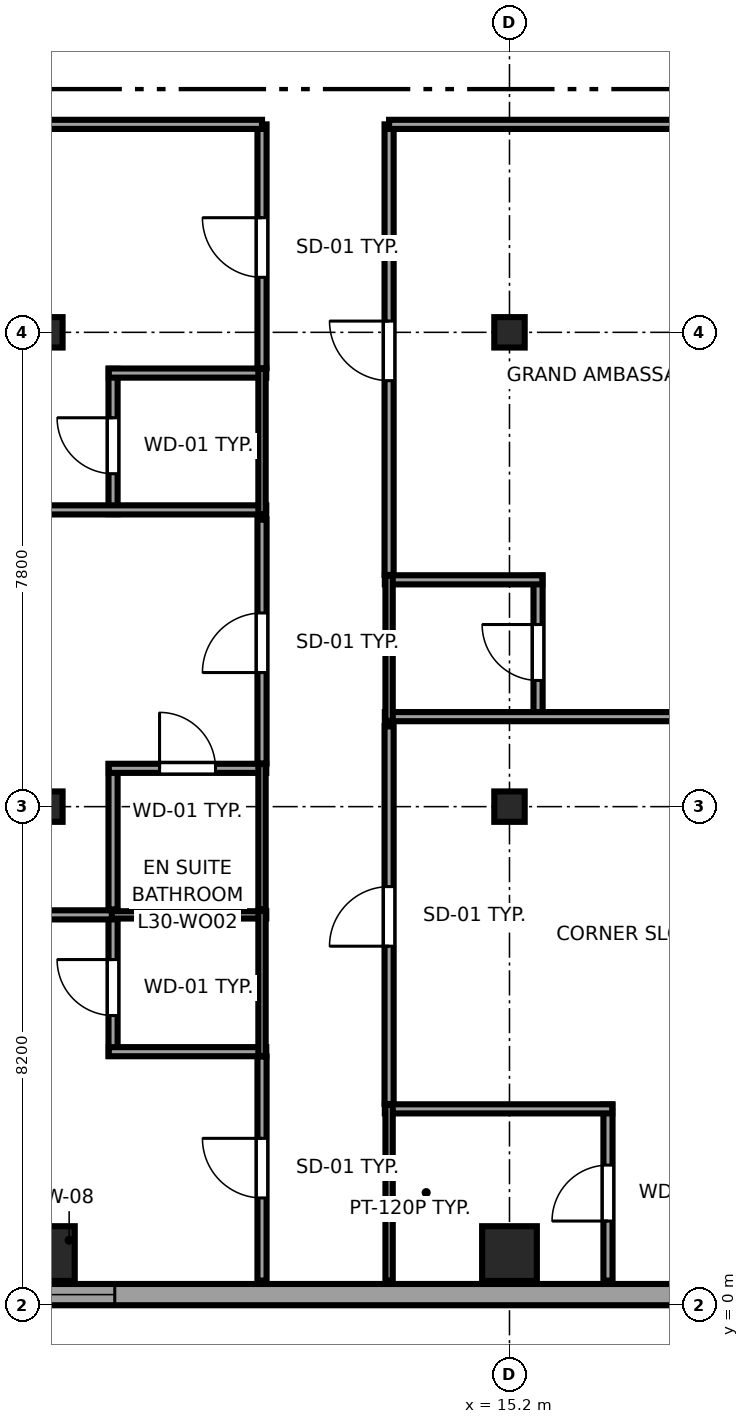
"""IFC4 building model, lengths in metres.
Left out: names, types, materials, properties, quantities, classifications, styles, units other than length and angle.
Written with IfcOpenShell. Run it as: python <this file> out.ifc"""

import sys

from ifc_helpers import new_model, si_unit, direction, frame, frame_2d, origin, origin_2d, place, context, subcontext, project, spatial, rectangle, i_section, extrude, source, transform, mapped, element, fill, save


model = new_model("IFC4")
c1 = context("Model", 3, precision=1e-05, world=origin(), true_north=direction((0.0, 1.0)))
c2 = subcontext(c1, "Body", "Model", "MODEL_VIEW")
j1 = project(units=[si_unit("LENGTHUNIT", "METRE"), si_unit("PLANEANGLEUNIT", "RADIAN")], contexts=[c1])
p1 = place(None, origin())
s1 = spatial("IfcSite", under=j1, at=p1, CompositionType="ELEMENT")
p2 = place(p1, origin())
s2 = spatial("IfcBuilding", under=s1, at=p2, CompositionType="ELEMENT")
p3 = place(p2, frame((0.0, 0.0, 118.65)))
s3 = spatial("IfcBuildingStorey", under=s2, at=p3, CompositionType="ELEMENT", Elevation=118.65)
m1 = source(origin(), c2, "Body", "SweptSolid", [
    extrude(rectangle(XDim=0.9, YDim=0.9, at=origin_2d()), origin(), (0.0, 0.0, 1.0), 3.55),
])
p4 = place(p3, frame((7.6, 0.85, 0.0), z_axis=(0.0, 0.0, 1.0), x_axis=(1.0, 0.0, 0.0)))
e1 = element("IfcColumn", 1, at=p4, inside=s3, PredefinedType="COLUMN", context=c2, shape_type="MappedRepresentation", body=[
    mapped(m1, transform((0.0, 0.0, 0.0), x_axis=(1.0, 0.0, 0.0), y_axis=(0.0, 1.0, 0.0), z_axis=(0.0, 0.0, 1.0), scale=1.0)),
])
m2 = source(origin(), c2, "Body", "SweptSolid", [
    extrude(i_section(OverallWidth=0.5, OverallDepth=0.5, WebThickness=0.022, FlangeThickness=0.034, at=origin_2d()), origin(), (0.0, 0.0, 1.0), 3.55),
])
for number, where, z_axis, x_axis in (
    (2, (7.6, 8.2, 0.0), (0.0, 0.0, 1.0), (1.0, 0.0, 0.0)),
    (3, (7.6, 16.0, 0.0), (0.0, 0.0, 1.0), (1.0, 0.0, 0.0)),
):
    element("IfcColumn", number, at=place(p3, frame(where, z_axis=z_axis, x_axis=x_axis)), inside=s3, PredefinedType="COLUMN", context=c2, shape_type="MappedRepresentation", body=[
        mapped(m2, transform((0.0, 0.0, 0.0), x_axis=(1.0, 0.0, 0.0), y_axis=(0.0, 1.0, 0.0), z_axis=(0.0, 0.0, 1.0), scale=1.0)),
    ])
p5 = place(p3, frame((15.2, 0.85, 0.0), z_axis=(0.0, 0.0, 1.0), x_axis=(1.0, 0.0, 0.0)))
e4 = element("IfcColumn", 4, at=p5, inside=s3, PredefinedType="COLUMN", context=c2, shape_type="MappedRepresentation", body=[
    mapped(m1, transform((0.0, 0.0, 0.0), x_axis=(1.0, 0.0, 0.0), y_axis=(0.0, 1.0, 0.0), z_axis=(0.0, 0.0, 1.0), scale=1.0)),
])
for number, where, z_axis, x_axis in (
    (5, (15.2, 8.2, 0.0), (0.0, 0.0, 1.0), (1.0, 0.0, 0.0)),
    (6, (15.2, 16.0, 0.0), (0.0, 0.0, 1.0), (1.0, 0.0, 0.0)),
):
    element("IfcColumn", number, at=place(p3, frame(where, z_axis=z_axis, x_axis=x_axis)), inside=s3, PredefinedType="COLUMN", context=c2, shape_type="MappedRepresentation", body=[
        mapped(m2, transform((0.0, 0.0, 0.0), x_axis=(1.0, 0.0, 0.0), y_axis=(0.0, 1.0, 0.0), z_axis=(0.0, 0.0, 1.0), scale=1.0)),
    ])
p6 = place(p3, frame((4.617, 0.175, 0.0), z_axis=(0.0, 0.0, 1.0), x_axis=(1.0, 0.0, 0.0)))
e7 = element("IfcWall", 7, at=p6, inside=s3, PredefinedType="SOLIDWALL", context=c2, shape_type="SweptSolid", body=[
    extrude(rectangle(XDim=18.008, YDim=0.35, at=frame_2d((9.004, 0.0))), origin(), (0.0, 0.0, 1.0), 3.37),
])
p7 = place(p6, frame((14.257, 0.0, 0.68)))
e8 = element("IfcOpeningElement", 8, at=p7, cuts=e7, PredefinedType="OPENING", context=c2, shape_type="SweptSolid", body=[
    extrude(rectangle(XDim=2.1, YDim=1.9, at=frame_2d((1.05, 0.95))), frame((0.0, 0.185, 0.0), z_axis=(0.0, -1.0, 0.0), x_axis=(1.0, 0.0, 0.0)), (0.0, 0.0, 1.0), 0.37),
])
p8 = place(p6, frame((2.591, 0.0, 0.62)))
e9 = element("IfcOpeningElement", 9, at=p8, cuts=e7, PredefinedType="OPENING", context=c2, shape_type="SweptSolid", body=[
    extrude(rectangle(XDim=1.5, YDim=1.55, at=frame_2d((0.75, 0.775))), frame((0.0, 0.185, 0.0), z_axis=(0.0, -1.0, 0.0), x_axis=(1.0, 0.0, 0.0)), (0.0, 0.0, 1.0), 0.37),
])
p9 = place(p3, frame((8.68, 4.1, 0.0), z_axis=(0.0, 0.0, 1.0), x_axis=(0.0, 1.0, 0.0)))
e10 = element("IfcWall", 10, at=p9, inside=s3, PredefinedType="PARTITIONING", context=c2, shape_type="SweptSolid", body=[
    extrude(rectangle(XDim=2.39, YDim=0.15, at=frame_2d((1.195, 0.0))), origin(), (0.0, 0.0, 1.0), 3.37),
])
p10 = place(p9, frame((0.665, 0.0, 0.0)))
e11 = element("IfcOpeningElement", 11, at=p10, cuts=e10, PredefinedType="OPENING", context=c2, shape_type="SweptSolid", body=[
    extrude(rectangle(XDim=0.92, YDim=2.01, at=frame_2d((0.46, 1.005))), frame((0.0, 0.085, 0.0), z_axis=(0.0, -1.0, 0.0), x_axis=(1.0, 0.0, 0.0)), (0.0, 0.0, 1.0), 0.17),
])
p11 = place(p3, frame((8.61, 4.17, 0.0), z_axis=(0.0, 0.0, 1.0), x_axis=(1.0, 0.0, 0.0)))
e12 = element("IfcWall", 12, at=p11, inside=s3, PredefinedType="PARTITIONING", context=c2, shape_type="SweptSolid", body=[
    extrude(rectangle(XDim=2.59, YDim=0.15, at=frame_2d((1.295, 0.0))), origin(), (0.0, 0.0, 1.0), 3.37),
])
p12 = place(p3, frame((8.61, 6.42, 0.0), z_axis=(0.0, 0.0, 1.0), x_axis=(1.0, 0.0, 0.0)))
e13 = element("IfcWall", 13, at=p12, inside=s3, PredefinedType="PLUMBINGWALL", context=c2, shape_type="SweptSolid", body=[
    extrude(rectangle(XDim=2.59, YDim=0.12, at=frame_2d((1.295, 0.0))), origin(), (0.0, 0.0, 1.0), 3.37),
])
p13 = place(p3, frame((11.13, 4.1, 0.0), z_axis=(0.0, 0.0, 1.0), x_axis=(0.0, 1.0, 0.0)))
e14 = element("IfcWall", 14, at=p13, inside=s3, PredefinedType="PLUMBINGWALL", context=c2, shape_type="SweptSolid", body=[
    extrude(rectangle(XDim=2.39, YDim=0.12, at=frame_2d((1.195, 0.0))), origin(), (0.0, 0.0, 1.0), 3.37),
])
p14 = place(p3, frame((8.68, 6.51, 0.0), z_axis=(0.0, 0.0, 1.0), x_axis=(0.0, 1.0, 0.0)))
e15 = element("IfcWall", 15, at=p14, inside=s3, PredefinedType="PARTITIONING", context=c2, shape_type="SweptSolid", body=[
    extrude(rectangle(XDim=2.39, YDim=0.15, at=frame_2d((1.195, 0.0))), origin(), (0.0, 0.0, 1.0), 3.37),
])
p15 = place(p3, frame((8.61, 8.83, 0.0), z_axis=(0.0, 0.0, 1.0), x_axis=(1.0, 0.0, 0.0)))
e16 = element("IfcWall", 16, at=p15, inside=s3, PredefinedType="PARTITIONING", context=c2, shape_type="SweptSolid", body=[
    extrude(rectangle(XDim=2.59, YDim=0.15, at=frame_2d((1.295, 0.0))), origin(), (0.0, 0.0, 1.0), 3.37),
])
p16 = place(p15, frame((0.835, 0.0, 0.0)))
e17 = element("IfcOpeningElement", 17, at=p16, cuts=e16, PredefinedType="OPENING", context=c2, shape_type="SweptSolid", body=[
    extrude(rectangle(XDim=0.92, YDim=2.01, at=frame_2d((0.46, 1.005))), frame((0.0, 0.085, 0.0), z_axis=(0.0, -1.0, 0.0), x_axis=(1.0, 0.0, 0.0)), (0.0, 0.0, 1.0), 0.17),
])
p17 = place(p3, frame((11.13, 6.51, 0.0), z_axis=(0.0, 0.0, 1.0), x_axis=(0.0, 1.0, 0.0)))
e18 = element("IfcWall", 18, at=p17, inside=s3, PredefinedType="PLUMBINGWALL", context=c2, shape_type="SweptSolid", body=[
    extrude(rectangle(XDim=2.39, YDim=0.12, at=frame_2d((1.195, 0.0))), origin(), (0.0, 0.0, 1.0), 3.37),
])
p18 = place(p3, frame((8.68, 13.01, 0.0), z_axis=(0.0, 0.0, 1.0), x_axis=(0.0, 1.0, 0.0)))
e19 = element("IfcWall", 19, at=p18, inside=s3, PredefinedType="PARTITIONING", context=c2, shape_type="SweptSolid", body=[
    extrude(rectangle(XDim=2.39, YDim=0.15, at=frame_2d((1.195, 0.0))), origin(), (0.0, 0.0, 1.0), 3.37),
])
p19 = place(p18, frame((0.665, 0.0, 0.0)))
e20 = element("IfcOpeningElement", 20, at=p19, cuts=e19, PredefinedType="OPENING", context=c2, shape_type="SweptSolid", body=[
    extrude(rectangle(XDim=0.92, YDim=2.01, at=frame_2d((0.46, 1.005))), frame((0.0, 0.085, 0.0), z_axis=(0.0, -1.0, 0.0), x_axis=(1.0, 0.0, 0.0)), (0.0, 0.0, 1.0), 0.17),
])
p20 = place(p3, frame((0.405, 13.08, 0.0), z_axis=(0.0, 0.0, 1.0), x_axis=(1.0, 0.0, 0.0)))
e21 = element("IfcWall", 21, at=p20, inside=s3, PredefinedType="PARTITIONING", context=c2, shape_type="SweptSolid", body=[
    extrude(rectangle(XDim=10.795, YDim=0.15, at=frame_2d((5.397, 0.0))), origin(), (0.0, 0.0, 1.0), 3.37),
])
p21 = place(p3, frame((8.61, 15.33, 0.0), z_axis=(0.0, 0.0, 1.0), x_axis=(1.0, 0.0, 0.0)))
e22 = element("IfcWall", 22, at=p21, inside=s3, PredefinedType="PARTITIONING", context=c2, shape_type="SweptSolid", body=[
    extrude(rectangle(XDim=2.59, YDim=0.15, at=frame_2d((1.295, 0.0))), origin(), (0.0, 0.0, 1.0), 3.37),
])
p22 = place(p3, frame((11.13, 13.01, 0.0), z_axis=(0.0, 0.0, 1.0), x_axis=(0.0, 1.0, 0.0)))
e23 = element("IfcWall", 23, at=p22, inside=s3, PredefinedType="PLUMBINGWALL", context=c2, shape_type="SweptSolid", body=[
    extrude(rectangle(XDim=2.39, YDim=0.12, at=frame_2d((1.195, 0.0))), origin(), (0.0, 0.0, 1.0), 3.37),
])
p23 = place(p3, frame((16.82, 0.405, 0.0), z_axis=(0.0, 0.0, 1.0), x_axis=(0.0, 1.0, 0.0)))
e24 = element("IfcWall", 24, at=p23, inside=s3, PredefinedType="PARTITIONING", context=c2, shape_type="SweptSolid", body=[
    extrude(rectangle(XDim=2.895, YDim=0.15, at=frame_2d((1.448, 0.0))), origin(), (0.0, 0.0, 1.0), 3.37),
])
p24 = place(p23, frame((0.98, 0.0, 0.0)))
e25 = element("IfcOpeningElement", 25, at=p24, cuts=e24, PredefinedType="OPENING", context=c2, shape_type="SweptSolid", body=[
    extrude(rectangle(XDim=0.92, YDim=2.01, at=frame_2d((0.46, 1.005))), frame((0.0, 0.085, 0.0), z_axis=(0.0, -1.0, 0.0), x_axis=(1.0, 0.0, 0.0)), (0.0, 0.0, 1.0), 0.17),
])
p25 = place(p3, frame((13.15, 3.23, 0.0), z_axis=(0.0, 0.0, 1.0), x_axis=(1.0, 0.0, 0.0)))
e26 = element("IfcWall", 26, at=p25, inside=s3, PredefinedType="PARTITIONING", context=c2, shape_type="SweptSolid", body=[
    extrude(rectangle(XDim=3.74, YDim=0.15, at=frame_2d((1.87, 0.0))), origin(), (0.0, 0.0, 1.0), 3.37),
])
p26 = place(p3, frame((13.22, 0.405, 0.0), z_axis=(0.0, 0.0, 1.0), x_axis=(0.0, 1.0, 0.0)))
e27 = element("IfcWall", 27, at=p26, inside=s3, PredefinedType="PLUMBINGWALL", context=c2, shape_type="SweptSolid", body=[
    extrude(rectangle(XDim=2.895, YDim=0.12, at=frame_2d((1.448, 0.0))), origin(), (0.0, 0.0, 1.0), 3.37),
])
p27 = place(p3, frame((15.67, 9.61, 0.0), z_axis=(0.0, 0.0, 1.0), x_axis=(0.0, 1.0, 0.0)))
e28 = element("IfcWall", 28, at=p27, inside=s3, PredefinedType="PARTITIONING", context=c2, shape_type="SweptSolid", body=[
    extrude(rectangle(XDim=2.39, YDim=0.15, at=frame_2d((1.195, 0.0))), origin(), (0.0, 0.0, 1.0), 3.37),
])
p28 = place(p27, frame((0.665, 0.0, 0.0)))
e29 = element("IfcOpeningElement", 29, at=p28, cuts=e28, PredefinedType="OPENING", context=c2, shape_type="SweptSolid", body=[
    extrude(rectangle(XDim=0.92, YDim=2.01, at=frame_2d((0.46, 1.005))), frame((0.0, 0.085, 0.0), z_axis=(0.0, -1.0, 0.0), x_axis=(1.0, 0.0, 0.0)), (0.0, 0.0, 1.0), 0.17),
])
p29 = place(p3, frame((13.15, 9.68, 0.0), z_axis=(0.0, 0.0, 1.0), x_axis=(1.0, 0.0, 0.0)))
e30 = element("IfcWall", 30, at=p29, inside=s3, PredefinedType="PARTITIONING", context=c2, shape_type="SweptSolid", body=[
    extrude(rectangle(XDim=9.2, YDim=0.15, at=frame_2d((4.6, 0.0))), origin(), (0.0, 0.0, 1.0), 3.37),
])
p30 = place(p3, frame((13.15, 11.93, 0.0), z_axis=(0.0, 0.0, 1.0), x_axis=(1.0, 0.0, 0.0)))
e31 = element("IfcWall", 31, at=p30, inside=s3, PredefinedType="PARTITIONING", context=c2, shape_type="SweptSolid", body=[
    extrude(rectangle(XDim=2.59, YDim=0.15, at=frame_2d((1.295, 0.0))), origin(), (0.0, 0.0, 1.0), 3.37),
])
p31 = place(p3, frame((13.22, 9.61, 0.0), z_axis=(0.0, 0.0, 1.0), x_axis=(0.0, 1.0, 0.0)))
e32 = element("IfcWall", 32, at=p31, inside=s3, PredefinedType="PLUMBINGWALL", context=c2, shape_type="SweptSolid", body=[
    extrude(rectangle(XDim=2.39, YDim=0.12, at=frame_2d((1.195, 0.0))), origin(), (0.0, 0.0, 1.0), 3.37),
])
p32 = place(p3, frame((11.13, 0.405, 0.0), z_axis=(0.0, 0.0, 1.0), x_axis=(0.0, 1.0, 0.0)))
e33 = element("IfcWall", 33, at=p32, inside=s3, PredefinedType="PARTITIONING", context=c2, shape_type="SweptSolid", body=[
    extrude(rectangle(XDim=3.685, YDim=0.15, at=frame_2d((1.843, 0.0))), origin(), (0.0, 0.0, 1.0), 3.37),
])
p33 = place(p32, frame((1.36, 0.0, 0.0)))
e34 = element("IfcOpeningElement", 34, at=p33, cuts=e33, PredefinedType="OPENING", context=c2, shape_type="SweptSolid", body=[
    extrude(rectangle(XDim=0.98, YDim=2.12, at=frame_2d((0.49, 1.06))), frame((0.0, 0.085, 0.0), z_axis=(0.0, -1.0, 0.0), x_axis=(1.0, 0.0, 0.0)), (0.0, 0.0, 1.0), 0.17),
])
p34 = place(p3, frame((0.405, 6.42, 0.0), z_axis=(0.0, 0.0, 1.0), x_axis=(1.0, 0.0, 0.0)))
e35 = element("IfcWall", 35, at=p34, inside=s3, PredefinedType="PARTITIONING", context=c2, shape_type="SweptSolid", body=[
    extrude(rectangle(XDim=8.255, YDim=0.15, at=frame_2d((4.127, 0.0))), origin(), (0.0, 0.0, 1.0), 3.37),
])
p35 = place(p3, frame((11.13, 8.91, 0.0), z_axis=(0.0, 0.0, 1.0), x_axis=(0.0, 1.0, 0.0)))
e36 = element("IfcWall", 36, at=p35, inside=s3, PredefinedType="PARTITIONING", context=c2, shape_type="SweptSolid", body=[
    extrude(rectangle(XDim=4.01, YDim=0.15, at=frame_2d((2.005, 0.0))), origin(), (0.0, 0.0, 1.0), 3.37),
])
p36 = place(p35, frame((1.495, 0.0, 0.0)))
e37 = element("IfcOpeningElement", 37, at=p36, cuts=e36, PredefinedType="OPENING", context=c2, shape_type="SweptSolid", body=[
    extrude(rectangle(XDim=0.98, YDim=2.12, at=frame_2d((0.49, 1.06))), frame((0.0, 0.085, 0.0), z_axis=(0.0, -1.0, 0.0), x_axis=(1.0, 0.0, 0.0)), (0.0, 0.0, 1.0), 0.17),
])
p37 = place(p3, frame((11.13, 15.41, 0.0), z_axis=(0.0, 0.0, 1.0), x_axis=(0.0, 1.0, 0.0)))
e38 = element("IfcWall", 38, at=p37, inside=s3, PredefinedType="PARTITIONING", context=c2, shape_type="SweptSolid", body=[
    extrude(rectangle(XDim=4.01, YDim=0.15, at=frame_2d((2.005, 0.0))), origin(), (0.0, 0.0, 1.0), 3.37),
])
p38 = place(p37, frame((1.495, 0.0, 0.0)))
e39 = element("IfcOpeningElement", 39, at=p38, cuts=e38, PredefinedType="OPENING", context=c2, shape_type="SweptSolid", body=[
    extrude(rectangle(XDim=0.98, YDim=2.12, at=frame_2d((0.49, 1.06))), frame((0.0, 0.085, 0.0), z_axis=(0.0, -1.0, 0.0), x_axis=(1.0, 0.0, 0.0)), (0.0, 0.0, 1.0), 0.17),
])
p39 = place(p3, frame((0.405, 19.42, 0.0), z_axis=(0.0, 0.0, 1.0), x_axis=(1.0, 0.0, 0.0)))
e40 = element("IfcWall", 40, at=p39, inside=s3, PredefinedType="PARTITIONING", context=c2, shape_type="SweptSolid", body=[
    extrude(rectangle(XDim=10.725, YDim=0.15, at=frame_2d((5.362, 0.0))), origin(), (0.0, 0.0, 1.0), 3.37),
])
p40 = place(p3, frame((13.22, 3.31, 0.0), z_axis=(0.0, 0.0, 1.0), x_axis=(0.0, 1.0, 0.0)))
e41 = element("IfcWall", 41, at=p40, inside=s3, PredefinedType="PARTITIONING", context=c2, shape_type="SweptSolid", body=[
    extrude(rectangle(XDim=6.21, YDim=0.15, at=frame_2d((3.105, 0.0))), origin(), (0.0, 0.0, 1.0), 3.37),
])
p41 = place(p40, frame((2.595, 0.0, 0.0)))
e42 = element("IfcOpeningElement", 42, at=p41, cuts=e41, PredefinedType="OPENING", context=c2, shape_type="SweptSolid", body=[
    extrude(rectangle(XDim=0.98, YDim=2.12, at=frame_2d((0.49, 1.06))), frame((0.0, 0.085, 0.0), z_axis=(0.0, -1.0, 0.0), x_axis=(1.0, 0.0, 0.0)), (0.0, 0.0, 1.0), 0.17),
])
p42 = place(p3, frame((13.22, 12.01, 0.0), z_axis=(0.0, 0.0, 1.0), x_axis=(0.0, 1.0, 0.0)))
e43 = element("IfcWall", 43, at=p42, inside=s3, PredefinedType="PARTITIONING", context=c2, shape_type="SweptSolid", body=[
    extrude(rectangle(XDim=7.41, YDim=0.15, at=frame_2d((3.705, 0.0))), origin(), (0.0, 0.0, 1.0), 3.37),
])
p43 = place(p42, frame((3.195, 0.0, 0.0)))
e44 = element("IfcOpeningElement", 44, at=p43, cuts=e43, PredefinedType="OPENING", context=c2, shape_type="SweptSolid", body=[
    extrude(rectangle(XDim=0.98, YDim=2.12, at=frame_2d((0.49, 1.06))), frame((0.0, 0.085, 0.0), z_axis=(0.0, -1.0, 0.0), x_axis=(1.0, 0.0, 0.0)), (0.0, 0.0, 1.0), 0.17),
])
p44 = place(p3, frame((13.22, 19.42, 0.0), z_axis=(0.0, 0.0, 1.0), x_axis=(1.0, 0.0, 0.0)))
e45 = element("IfcWall", 45, at=p44, inside=s3, PredefinedType="PARTITIONING", context=c2, shape_type="SweptSolid", body=[
    extrude(rectangle(XDim=9.13, YDim=0.15, at=frame_2d((4.565, 0.0))), origin(), (0.0, 0.0, 1.0), 3.37),
])
m3 = source(origin(), c2, "Body", "SweptSolid", [
    extrude(rectangle(XDim=1.5, YDim=1.55, at=frame_2d((0.75, 0.775))), frame((0.0, 0.09, 0.0), z_axis=(0.0, -1.0, 0.0), x_axis=(1.0, 0.0, 0.0)), (0.0, 0.0, 1.0), 0.06),
])
p45 = place(p8, origin())
e46 = element("IfcWindow", 46, at=p45, inside=s3, PartitioningType="SINGLE_PANEL", PredefinedType="WINDOW", context=c2, shape_type="MappedRepresentation", body=[
    mapped(m3, transform((0.0, 0.0, 0.0), x_axis=(1.0, 0.0, 0.0), y_axis=(0.0, 1.0, 0.0), z_axis=(0.0, 0.0, 1.0), scale=1.0)),
])
fill(e9, e46)
m4 = source(origin(), c2, "Body", "SweptSolid", [
    extrude(rectangle(XDim=0.92, YDim=2.01, at=frame_2d((0.46, 1.005))), frame((0.0, 0.025, 0.0), z_axis=(0.0, -1.0, 0.0), x_axis=(1.0, 0.0, 0.0)), (0.0, 0.0, 1.0), 0.05),
])
p46 = place(p10, origin())
e47 = element("IfcDoor", 47, at=p46, inside=s3, OperationType="SINGLE_SWING_RIGHT", PredefinedType="DOOR", context=c2, shape_type="MappedRepresentation", body=[
    mapped(m4, transform((0.0, 0.0, 0.0), x_axis=(1.0, 0.0, 0.0), y_axis=(0.0, 1.0, 0.0), z_axis=(0.0, 0.0, 1.0), scale=1.0)),
])
fill(e11, e47)
p47 = place(p16, origin())
e48 = element("IfcDoor", 48, at=p47, inside=s3, OperationType="SINGLE_SWING_LEFT", PredefinedType="DOOR", context=c2, shape_type="MappedRepresentation", body=[
    mapped(m4, transform((0.0, 0.0, 0.0), x_axis=(1.0, 0.0, 0.0), y_axis=(0.0, 1.0, 0.0), z_axis=(0.0, 0.0, 1.0), scale=1.0)),
])
fill(e17, e48)
p48 = place(p19, origin())
e49 = element("IfcDoor", 49, at=p48, inside=s3, OperationType="SINGLE_SWING_RIGHT", PredefinedType="DOOR", context=c2, shape_type="MappedRepresentation", body=[
    mapped(m4, transform((0.0, 0.0, 0.0), x_axis=(1.0, 0.0, 0.0), y_axis=(0.0, 1.0, 0.0), z_axis=(0.0, 0.0, 1.0), scale=1.0)),
])
fill(e20, e49)
p49 = place(p24, origin())
e50 = element("IfcDoor", 50, at=p49, inside=s3, OperationType="SINGLE_SWING_LEFT", PredefinedType="DOOR", context=c2, shape_type="MappedRepresentation", body=[
    mapped(m4, transform((0.0, 0.0, 0.0), x_axis=(1.0, 0.0, 0.0), y_axis=(0.0, 1.0, 0.0), z_axis=(0.0, 0.0, 1.0), scale=1.0)),
])
fill(e25, e50)
p50 = place(p28, origin())
e51 = element("IfcDoor", 51, at=p50, inside=s3, OperationType="SINGLE_SWING_RIGHT", PredefinedType="DOOR", context=c2, shape_type="MappedRepresentation", body=[
    mapped(m4, transform((0.0, 0.0, 0.0), x_axis=(1.0, 0.0, 0.0), y_axis=(0.0, 1.0, 0.0), z_axis=(0.0, 0.0, 1.0), scale=1.0)),
])
fill(e29, e51)
m5 = source(origin(), c2, "Body", "SweptSolid", [
    extrude(rectangle(XDim=0.98, YDim=2.12, at=frame_2d((0.49, 1.06))), frame((0.0, 0.025, 0.0), z_axis=(0.0, -1.0, 0.0), x_axis=(1.0, 0.0, 0.0)), (0.0, 0.0, 1.0), 0.05),
])
p51 = place(p33, origin())
e52 = element("IfcDoor", 52, at=p51, inside=s3, OperationType="SINGLE_SWING_RIGHT", PredefinedType="DOOR", context=c2, shape_type="MappedRepresentation", body=[
    mapped(m5, transform((0.0, 0.0, 0.0), x_axis=(1.0, 0.0, 0.0), y_axis=(0.0, 1.0, 0.0), z_axis=(0.0, 0.0, 1.0), scale=1.0)),
])
fill(e34, e52)
p52 = place(p36, origin())
e53 = element("IfcDoor", 53, at=p52, inside=s3, OperationType="SINGLE_SWING_LEFT", PredefinedType="DOOR", context=c2, shape_type="MappedRepresentation", body=[
    mapped(m5, transform((0.0, 0.0, 0.0), x_axis=(1.0, 0.0, 0.0), y_axis=(0.0, 1.0, 0.0), z_axis=(0.0, 0.0, 1.0), scale=1.0)),
])
fill(e37, e53)
p53 = place(p38, origin())
e54 = element("IfcDoor", 54, at=p53, inside=s3, OperationType="SINGLE_SWING_RIGHT", PredefinedType="DOOR", context=c2, shape_type="MappedRepresentation", body=[
    mapped(m5, transform((0.0, 0.0, 0.0), x_axis=(1.0, 0.0, 0.0), y_axis=(0.0, 1.0, 0.0), z_axis=(0.0, 0.0, 1.0), scale=1.0)),
])
fill(e39, e54)
p54 = place(p41, origin())
e55 = element("IfcDoor", 55, at=p54, inside=s3, OperationType="SINGLE_SWING_LEFT", PredefinedType="DOOR", context=c2, shape_type="MappedRepresentation", body=[
    mapped(m5, transform((0.0, 0.0, 0.0), x_axis=(1.0, 0.0, 0.0), y_axis=(0.0, 1.0, 0.0), z_axis=(0.0, 0.0, 1.0), scale=1.0)),
])
fill(e42, e55)
p55 = place(p43, origin())
e56 = element("IfcDoor", 56, at=p55, inside=s3, OperationType="SINGLE_SWING_RIGHT", PredefinedType="DOOR", context=c2, shape_type="MappedRepresentation", body=[
    mapped(m5, transform((0.0, 0.0, 0.0), x_axis=(1.0, 0.0, 0.0), y_axis=(0.0, 1.0, 0.0), z_axis=(0.0, 0.0, 1.0), scale=1.0)),
])
fill(e44, e56)
save(model, sys.argv[1])
